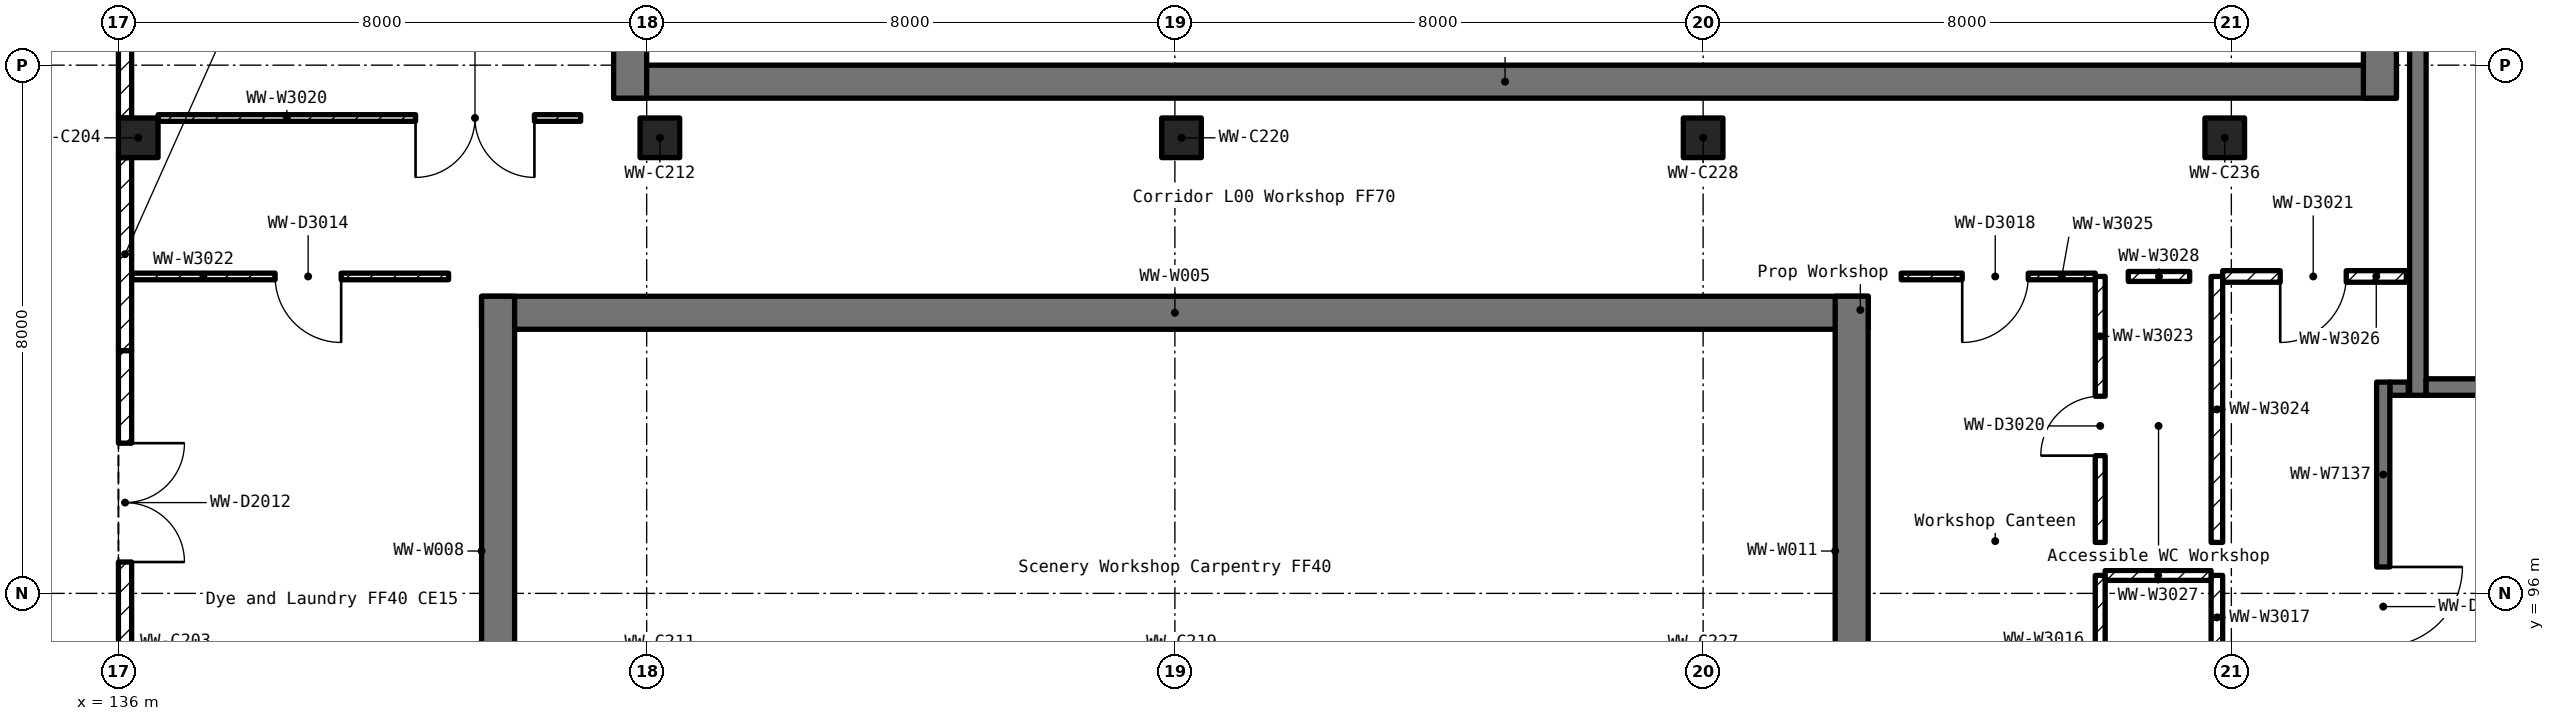
"""IFC4 building model, lengths in metres.
Left out: names, types, materials, properties, quantities, classifications, styles, units other than length and angle.
Written with IfcOpenShell. Run it as: python <this file> out.ifc"""

import sys

from ifc_helpers import new_model, si_unit, direction, frame, frame_2d, origin, origin_2d, place, context, subcontext, project, spatial, rectangle, extrude, element, fill, save


model = new_model("IFC4")
c1 = context("Model", 3, precision=1e-05, world=origin(), true_north=direction((0.0, 1.0)))
c2 = subcontext(c1, "Body", "Model", "MODEL_VIEW")
j1 = project(units=[si_unit("LENGTHUNIT", "METRE"), si_unit("PLANEANGLEUNIT", "RADIAN")], contexts=[c1])
p1 = place(None, origin())
s1 = spatial("IfcSite", under=j1, at=p1, CompositionType="ELEMENT")
p2 = place(p1, origin())
s2 = spatial("IfcBuilding", under=s1, at=p2, CompositionType="ELEMENT")
p3 = place(p2, origin())
s3 = spatial("IfcBuildingStorey", under=s2, at=p3, CompositionType="ELEMENT", Elevation=0.0)
for number, where, z_axis, x_axis in (
    (1, (136.3, 102.9, 0.0), (0.0, 0.0, 1.0), (1.0, 0.0, 0.0)),
    (2, (144.2, 102.9, 0.0), (0.0, 0.0, 1.0), (1.0, 0.0, 0.0)),
    (3, (152.1, 102.9, 0.0), (0.0, 0.0, 1.0), (1.0, 0.0, 0.0)),
    (4, (160.0, 102.9, 0.0), (0.0, 0.0, 1.0), (1.0, 0.0, 0.0)),
    (5, (167.9, 102.9, 0.0), (0.0, 0.0, 1.0), (1.0, 0.0, 0.0)),
):
    element("IfcColumn", number, at=place(p3, frame(where, z_axis=z_axis, x_axis=x_axis)), inside=s3, PredefinedType="COLUMN", context=c2, shape_type="SweptSolid", body=[
        extrude(rectangle(XDim=0.6, YDim=0.6, at=origin_2d()), origin(), (0.0, 0.0, 1.0), 6.0),
    ])
p4 = place(p3, frame((141.5, 100.25, 0.0), z_axis=(0.0, 0.0, 1.0), x_axis=(1.0, 0.0, 0.0)))
e6 = element("IfcWall", 6, at=p4, inside=s3, PredefinedType="SHEAR", context=c2, shape_type="SweptSolid", body=[
    extrude(rectangle(XDim=21.0, YDim=0.5, at=frame_2d((10.5, 0.0))), origin(), (0.0, 0.0, 1.0), 6.0),
])
for number, where, z_axis, x_axis in (
    (7, (141.75, 81.5, 0.0), (0.0, 0.0, 1.0), (0.0, 1.0, 0.0)),
    (8, (162.25, 81.5, 0.0), (0.0, 0.0, 1.0), (0.0, 1.0, 0.0)),
):
    element("IfcWall", number, at=place(p3, frame(where, z_axis=z_axis, x_axis=x_axis)), inside=s3, PredefinedType="SHEAR", context=c2, shape_type="SweptSolid", body=[
        extrude(rectangle(XDim=19.0, YDim=0.5, at=frame_2d((9.5, 0.0))), origin(), (0.0, 0.0, 1.0), 6.0),
    ])
p5 = place(p3, frame((143.5, 103.75, 0.0), z_axis=(0.0, 0.0, 1.0), x_axis=(1.0, 0.0, 0.0)))
e9 = element("IfcWall", 9, at=p5, inside=s3, PredefinedType="SHEAR", context=c2, shape_type="SweptSolid", body=[
    extrude(rectangle(XDim=27.0, YDim=0.5, at=frame_2d((13.5, 0.0))), origin(), (0.0, 0.0, 1.0), 6.0),
])
p6 = place(p3, frame((143.75, 103.5, 0.0), z_axis=(0.0, 0.0, 1.0), x_axis=(0.0, 1.0, 0.0)))
e10 = element("IfcWall", 10, at=p6, inside=s3, PredefinedType="SHEAR", context=c2, shape_type="SweptSolid", body=[
    extrude(rectangle(XDim=25.0, YDim=0.5, at=frame_2d((12.5, 0.0))), origin(), (0.0, 0.0, 1.0), 6.0),
])
p7 = place(p6, frame((11.6, 0.0, 0.0)))
e11 = element("IfcOpeningElement", 11, at=p7, cuts=e10, PredefinedType="OPENING", context=c2, shape_type="SweptSolid", body=[
    extrude(rectangle(XDim=1.8, YDim=2.1, at=frame_2d((0.9, 1.05))), frame((0.0, 0.262, 0.0), z_axis=(0.0, -1.0, 0.0), x_axis=(1.0, 0.0, 0.0)), (0.0, 0.0, 1.0), 0.524),
])
p8 = place(p3, frame((170.25, 103.5, 0.0), z_axis=(0.0, 0.0, 1.0), x_axis=(0.0, 1.0, 0.0)))
e12 = element("IfcWall", 12, at=p8, inside=s3, PredefinedType="SHEAR", context=c2, shape_type="SweptSolid", body=[
    extrude(rectangle(XDim=25.0, YDim=0.5, at=frame_2d((12.5, 0.0))), origin(), (0.0, 0.0, 1.0), 6.0),
])
p9 = place(p3, frame((136.1, 106.9, 0.0), z_axis=(0.0, 0.0, 1.0), x_axis=(0.0, -1.0, 0.0)))
e13 = element("IfcWall", 13, at=p9, inside=s3, PredefinedType="SOLIDWALL", context=c2, shape_type="SweptSolid", body=[
    extrude(rectangle(XDim=3.7, YDim=0.2, at=frame_2d((1.85, 0.0))), origin(), (0.0, 0.0, 1.0), 5.05),
])
p10 = place(p3, frame((136.1, 102.6, 0.0), z_axis=(0.0, 0.0, 1.0), x_axis=(0.0, -1.0, 0.0)))
e14 = element("IfcWall", 14, at=p10, inside=s3, PredefinedType="SOLIDWALL", context=c2, shape_type="SweptSolid", body=[
    extrude(rectangle(XDim=2.925, YDim=0.2, at=frame_2d((1.462, 0.0))), origin(), (0.0, 0.0, 1.0), 5.05),
])
p11 = place(p3, frame((136.1, 99.675, 0.0), z_axis=(0.0, 0.0, 1.0), x_axis=(0.0, -1.0, 0.0)))
e15 = element("IfcWall", 15, at=p11, inside=s3, PredefinedType="SOLIDWALL", context=c2, shape_type="SweptSolid", body=[
    extrude(rectangle(XDim=4.675, YDim=0.2, at=frame_2d((2.337, 0.0))), origin(), (0.0, 0.0, 1.0), 5.05),
])
p12 = place(p11, frame((1.4, 0.0, 0.0)))
e16 = element("IfcOpeningElement", 16, at=p12, cuts=e15, PredefinedType="OPENING", context=c2, shape_type="SweptSolid", body=[
    extrude(rectangle(XDim=1.8, YDim=2.4, at=frame_2d((0.9, 1.2))), frame((0.0, 0.112, 0.0), z_axis=(0.0, -1.0, 0.0), x_axis=(1.0, 0.0, 0.0)), (0.0, 0.0, 1.0), 0.224),
])
p13 = place(p3, frame((170.825, 105.6, 0.0), z_axis=(0.0, 0.0, 1.0), x_axis=(0.0, -1.0, 0.0)))
e17 = element("IfcWall", 17, at=p13, inside=s3, PredefinedType="SOLIDWALL", context=c2, shape_type="SweptSolid", body=[
    extrude(rectangle(XDim=6.6, YDim=0.25, at=frame_2d((3.3, 0.0))), origin(), (0.0, 0.0, 1.0), 6.0),
])
p14 = place(p3, frame((170.95, 99.125, 0.0), z_axis=(0.0, 0.0, 1.0), x_axis=(1.0, 0.0, 0.0)))
e18 = element("IfcWall", 18, at=p14, inside=s3, PredefinedType="SOLIDWALL", context=c2, shape_type="SweptSolid", body=[
    extrude(rectangle(XDim=3.1, YDim=0.25, at=frame_2d((1.55, 0.0))), origin(), (0.0, 0.0, 1.0), 6.0),
])
p15 = place(p14, frame((1.0, 0.0, 0.0)))
e19 = element("IfcOpeningElement", 19, at=p15, cuts=e18, PredefinedType="OPENING", context=c2, shape_type="SweptSolid", body=[
    extrude(rectangle(XDim=2.0, YDim=2.2, at=frame_2d((1.0, 1.1))), frame((0.0, 0.137, 0.0), z_axis=(0.0, -1.0, 0.0), x_axis=(1.0, 0.0, 0.0)), (0.0, 0.0, 1.0), 0.274),
])
p16 = place(p3, frame((170.68, 99.1, 0.0), z_axis=(0.0, 0.0, 1.0), x_axis=(-1.0, 0.0, 0.0)))
e20 = element("IfcWall", 20, at=p16, inside=s3, PredefinedType="PARTITIONING", context=c2, shape_type="SweptSolid", body=[
    extrude(rectangle(XDim=0.28, YDim=0.2, at=frame_2d((0.14, 0.0))), origin(), (0.0, 0.0, 1.0), 5.85),
])
p17 = place(p3, frame((170.3, 99.2, 0.0), z_axis=(0.0, 0.0, 1.0), x_axis=(0.0, -1.0, 0.0)))
e21 = element("IfcWall", 21, at=p17, inside=s3, PredefinedType="PARTITIONING", context=c2, shape_type="SweptSolid", body=[
    extrude(rectangle(XDim=6.8, YDim=0.2, at=frame_2d((3.4, 0.0))), origin(), (0.0, 0.0, 1.0), 5.85),
])
p18 = place(p17, frame((2.8, 0.0, 0.0)))
e22 = element("IfcOpeningElement", 22, at=p18, cuts=e21, PredefinedType="OPENING", context=c2, shape_type="SweptSolid", body=[
    extrude(rectangle(XDim=1.2, YDim=2.1, at=frame_2d((0.6, 1.05))), frame((0.0, 0.112, 0.0), z_axis=(0.0, -1.0, 0.0), x_axis=(1.0, 0.0, 0.0)), (0.0, 0.0, 1.0), 0.224),
])
p19 = place(p3, frame((166.014, 78.2, 0.0), z_axis=(0.0, 0.0, 1.0), x_axis=(0.0, 1.0, 0.0)))
e23 = element("IfcWall", 23, at=p19, inside=s3, PredefinedType="PARTITIONING", context=c2, shape_type="SweptSolid", body=[
    extrude(rectangle(XDim=18.072, YDim=0.15, at=frame_2d((9.036, 0.0))), origin(), (0.0, 0.0, 1.0), 4.95),
])
p20 = place(p19, frame((8.486, 0.0, 0.0)))
e24 = element("IfcOpeningElement", 24, at=p20, cuts=e23, PredefinedType="OPENING", context=c2, shape_type="SweptSolid", body=[
    extrude(rectangle(XDim=0.9, YDim=2.1, at=frame_2d((0.45, 1.05))), frame((0.0, 0.087, 0.0), z_axis=(0.0, -1.0, 0.0), x_axis=(1.0, 0.0, 0.0)), (0.0, 0.0, 1.0), 0.174),
])
p21 = place(p3, frame((167.781, 95.001, 0.0), z_axis=(0.0, 0.0, 1.0), x_axis=(0.0, 1.0, 0.0)))
e25 = element("IfcWall", 25, at=p21, inside=s3, PredefinedType="PARTITIONING", context=c2, shape_type="SweptSolid", body=[
    extrude(rectangle(XDim=1.271, YDim=0.175, at=frame_2d((0.635, 0.0))), origin(), (0.0, 0.0, 1.0), 4.95),
])
p22 = place(p3, frame((143.0, 103.2, 0.0), z_axis=(0.0, 0.0, 1.0), x_axis=(-1.0, 0.0, 0.0)))
e26 = element("IfcWall", 26, at=p22, inside=s3, PredefinedType="PARTITIONING", context=c2, shape_type="SweptSolid", body=[
    extrude(rectangle(XDim=6.399, YDim=0.1, at=frame_2d((3.199, 0.0))), origin(), (0.0, 0.0, 1.0), 4.95),
])
p23 = place(p22, frame((0.7, 0.0, 0.0)))
e27 = element("IfcOpeningElement", 27, at=p23, cuts=e26, PredefinedType="OPENING", context=c2, shape_type="SweptSolid", body=[
    extrude(rectangle(XDim=1.8, YDim=2.1, at=frame_2d((0.9, 1.05))), frame((0.0, 0.062, 0.0), z_axis=(0.0, -1.0, 0.0), x_axis=(1.0, 0.0, 0.0)), (0.0, 0.0, 1.0), 0.124),
])
p24 = place(p3, frame((141.0, 100.8, 0.0), z_axis=(0.0, 0.0, 1.0), x_axis=(-1.0, 0.0, 0.0)))
e28 = element("IfcWall", 28, at=p24, inside=s3, PredefinedType="PARTITIONING", context=c2, shape_type="SweptSolid", body=[
    extrude(rectangle(XDim=4.8, YDim=0.1, at=frame_2d((2.4, 0.0))), origin(), (0.0, 0.0, 1.0), 4.95),
])
p25 = place(p24, frame((1.627, 0.0, 0.0)))
e29 = element("IfcOpeningElement", 29, at=p25, cuts=e28, PredefinedType="OPENING", context=c2, shape_type="SweptSolid", body=[
    extrude(rectangle(XDim=1.0, YDim=2.1, at=frame_2d((0.5, 1.05))), frame((0.0, 0.062, 0.0), z_axis=(0.0, -1.0, 0.0), x_axis=(1.0, 0.0, 0.0)), (0.0, 0.0, 1.0), 0.124),
])
p26 = place(p3, frame((166.014, 96.772, 0.0), z_axis=(0.0, 0.0, 1.0), x_axis=(0.0, 1.0, 0.0)))
e30 = element("IfcWall", 30, at=p26, inside=s3, PredefinedType="PARTITIONING", context=c2, shape_type="SweptSolid", body=[
    extrude(rectangle(XDim=4.028, YDim=0.15, at=frame_2d((2.014, 0.0))), origin(), (0.0, 0.0, 1.0), 4.95),
])
p27 = place(p26, frame((1.314, 0.0, 0.0)))
e31 = element("IfcOpeningElement", 31, at=p27, cuts=e30, PredefinedType="OPENING", context=c2, shape_type="SweptSolid", body=[
    extrude(rectangle(XDim=0.9, YDim=2.1, at=frame_2d((0.45, 1.05))), frame((0.0, 0.087, 0.0), z_axis=(0.0, -1.0, 0.0), x_axis=(1.0, 0.0, 0.0)), (0.0, 0.0, 1.0), 0.174),
])
p28 = place(p3, frame((167.781, 100.8, 0.0), z_axis=(0.0, 0.0, 1.0), x_axis=(0.0, -1.0, 0.0)))
e32 = element("IfcWall", 32, at=p28, inside=s3, PredefinedType="PARTITIONING", context=c2, shape_type="SweptSolid", body=[
    extrude(rectangle(XDim=4.028, YDim=0.175, at=frame_2d((2.014, 0.0))), origin(), (0.0, 0.0, 1.0), 4.95),
])
p29 = place(p3, frame((165.939, 100.8, 0.0), z_axis=(0.0, 0.0, 1.0), x_axis=(-1.0, 0.0, 0.0)))
e33 = element("IfcWall", 33, at=p29, inside=s3, PredefinedType="PARTITIONING", context=c2, shape_type="SweptSolid", body=[
    extrude(rectangle(XDim=2.939, YDim=0.1, at=frame_2d((1.469, 0.0))), origin(), (0.0, 0.0, 1.0), 4.95),
])
p30 = place(p29, frame((1.015, 0.0, 0.0)))
e34 = element("IfcOpeningElement", 34, at=p30, cuts=e33, PredefinedType="OPENING", context=c2, shape_type="SweptSolid", body=[
    extrude(rectangle(XDim=1.0, YDim=2.1, at=frame_2d((0.5, 1.05))), frame((0.0, 0.062, 0.0), z_axis=(0.0, -1.0, 0.0), x_axis=(1.0, 0.0, 0.0)), (0.0, 0.0, 1.0), 0.124),
])
p31 = place(p3, frame((170.65, 100.8, 0.0), z_axis=(0.0, 0.0, 1.0), x_axis=(-1.0, 0.0, 0.0)))
e35 = element("IfcWall", 35, at=p31, inside=s3, PredefinedType="PARTITIONING", context=c2, shape_type="SweptSolid", body=[
    extrude(rectangle(XDim=2.781, YDim=0.175, at=frame_2d((1.391, 0.0))), origin(), (0.0, 0.0, 1.0), 4.95),
])
p32 = place(p31, frame((0.91, 0.0, 0.0)))
e36 = element("IfcOpeningElement", 36, at=p32, cuts=e35, PredefinedType="OPENING", context=c2, shape_type="SweptSolid", body=[
    extrude(rectangle(XDim=1.0, YDim=2.1, at=frame_2d((0.5, 1.05))), frame((0.0, 0.1, 0.0), z_axis=(0.0, -1.0, 0.0), x_axis=(1.0, 0.0, 0.0)), (0.0, 0.0, 1.0), 0.199),
])
p33 = place(p3, frame((167.693, 96.272, 0.0), z_axis=(0.0, 0.0, 1.0), x_axis=(-1.0, 0.0, 0.0)))
e37 = element("IfcWall", 37, at=p33, inside=s3, PredefinedType="PARTITIONING", context=c2, shape_type="SweptSolid", body=[
    extrude(rectangle(XDim=1.604, YDim=0.15, at=frame_2d((0.802, 0.0))), origin(), (0.0, 0.0, 1.0), 4.95),
])
p34 = place(p3, frame((167.369, 100.8, 0.0), z_axis=(0.0, 0.0, 1.0), x_axis=(-1.0, 0.0, 0.0)))
e38 = element("IfcWall", 38, at=p34, inside=s3, PredefinedType="PARTITIONING", context=c2, shape_type="SweptSolid", body=[
    extrude(rectangle(XDim=0.93, YDim=0.15, at=frame_2d((0.465, 0.0))), origin(), (0.0, 0.0, 1.0), 4.95),
])
p35 = place(p18, origin())
e39 = element("IfcDoor", 39, at=p35, inside=s3, OperationType="SINGLE_SWING_LEFT", PredefinedType="DOOR", context=c2, shape_type="SweptSolid", body=[
    extrude(rectangle(XDim=1.2, YDim=2.1, at=frame_2d((0.6, 1.05))), frame((0.0, 0.025, 0.0), z_axis=(0.0, -1.0, 0.0), x_axis=(1.0, 0.0, 0.0)), (0.0, 0.0, 1.0), 0.05),
])
fill(e22, e39)
p36 = place(p23, origin())
e40 = element("IfcDoor", 40, at=p36, inside=s3, OperationType="DOUBLE_DOOR_SINGLE_SWING", PredefinedType="DOOR", context=c2, shape_type="SweptSolid", body=[
    extrude(rectangle(XDim=1.8, YDim=2.1, at=frame_2d((0.9, 1.05))), frame((0.0, 0.025, 0.0), z_axis=(0.0, -1.0, 0.0), x_axis=(1.0, 0.0, 0.0)), (0.0, 0.0, 1.0), 0.05),
])
fill(e27, e40)
p37 = place(p25, origin())
e41 = element("IfcDoor", 41, at=p37, inside=s3, OperationType="SINGLE_SWING_LEFT", PredefinedType="DOOR", context=c2, shape_type="SweptSolid", body=[
    extrude(rectangle(XDim=1.0, YDim=2.1, at=frame_2d((0.5, 1.05))), frame((0.0, 0.025, 0.0), z_axis=(0.0, -1.0, 0.0), x_axis=(1.0, 0.0, 0.0)), (0.0, 0.0, 1.0), 0.05),
])
fill(e29, e41)
p38 = place(p30, origin())
e42 = element("IfcDoor", 42, at=p38, inside=s3, OperationType="SINGLE_SWING_RIGHT", PredefinedType="DOOR", context=c2, shape_type="SweptSolid", body=[
    extrude(rectangle(XDim=1.0, YDim=2.1, at=frame_2d((0.5, 1.05))), frame((0.0, 0.025, 0.0), z_axis=(0.0, -1.0, 0.0), x_axis=(1.0, 0.0, 0.0)), (0.0, 0.0, 1.0), 0.05),
])
fill(e34, e42)
p39 = place(p27, origin())
e43 = element("IfcDoor", 43, at=p39, inside=s3, OperationType="SINGLE_SWING_LEFT", PredefinedType="DOOR", context=c2, shape_type="SweptSolid", body=[
    extrude(rectangle(XDim=0.9, YDim=2.1, at=frame_2d((0.45, 1.05))), frame((0.0, 0.025, 0.0), z_axis=(0.0, -1.0, 0.0), x_axis=(1.0, 0.0, 0.0)), (0.0, 0.0, 1.0), 0.05),
])
fill(e31, e43)
p40 = place(p32, origin())
e44 = element("IfcDoor", 44, at=p40, inside=s3, OperationType="SINGLE_SWING_RIGHT", PredefinedType="DOOR", context=c2, shape_type="SweptSolid", body=[
    extrude(rectangle(XDim=1.0, YDim=2.1, at=frame_2d((0.5, 1.05))), frame((0.0, 0.025, 0.0), z_axis=(0.0, -1.0, 0.0), x_axis=(1.0, 0.0, 0.0)), (0.0, 0.0, 1.0), 0.05),
])
fill(e36, e44)
p41 = place(p12, origin())
e45 = element("IfcDoor", 45, at=p41, inside=s3, OperationType="DOUBLE_DOOR_DOUBLE_SWING", PredefinedType="DOOR", context=c2, shape_type="SweptSolid", body=[
    extrude(rectangle(XDim=1.8, YDim=2.4, at=frame_2d((0.9, 1.2))), frame((0.0, 0.025, 0.0), z_axis=(0.0, -1.0, 0.0), x_axis=(1.0, 0.0, 0.0)), (0.0, 0.0, 1.0), 0.05),
])
fill(e16, e45)
save(model, sys.argv[1])
